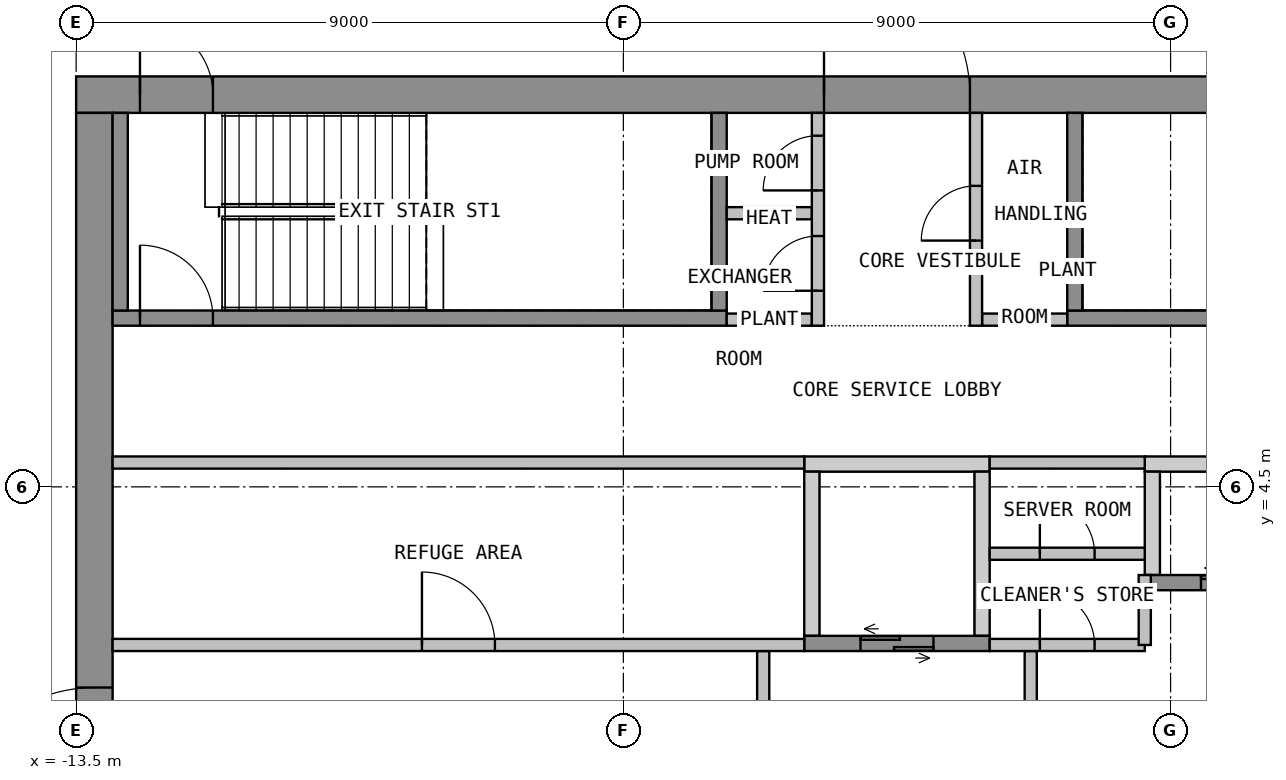
"""IFC4 building model, lengths in metres.
Left out: names, types, materials, properties, quantities, classifications, styles, units other than length and angle.
Written with IfcOpenShell. Run it as: python <this file> out.ifc"""

import sys

from ifc_helpers import new_model, si_unit, direction, frame, frame_2d, origin, place, context, subcontext, project, spatial, polyline, rectangle, outline, extrude, element, fill, save


model = new_model("IFC4")
c1 = context("Model", 3, precision=1e-05, world=origin(), true_north=direction((0.0, 1.0)))
c2 = subcontext(c1, "Body", "Model", "MODEL_VIEW")
j1 = project(units=[si_unit("LENGTHUNIT", "METRE"), si_unit("PLANEANGLEUNIT", "RADIAN")], contexts=[c1])
p1 = place(None, origin())
s1 = spatial("IfcSite", under=j1, at=p1, CompositionType="ELEMENT")
p2 = place(p1, origin())
s2 = spatial("IfcBuilding", under=s1, at=p2, CompositionType="ELEMENT")
p3 = place(p2, frame((0.0, 0.0, 179.4)))
s3 = spatial("IfcBuildingStorey", under=s2, at=p3, CompositionType="ELEMENT", Elevation=179.4)
p4 = place(p3, frame((-13.5, 10.95, 0.0), z_axis=(0.0, 0.0, 1.0), x_axis=(1.0, 0.0, 0.0)))
e1 = element("IfcWall", 1, at=p4, inside=s3, PredefinedType="SHEAR", context=c2, shape_type="SweptSolid", body=[
    extrude(rectangle(XDim=27.0, YDim=0.6, at=frame_2d((13.5, 0.0))), origin(), (0.0, 0.0, 1.0), 4.15),
])
p5 = place(p4, frame((12.3, 0.0, 0.0)))
e2 = element("IfcOpeningElement", 2, at=p5, cuts=e1, PredefinedType="OPENING", context=c2, shape_type="SweptSolid", body=[
    extrude(rectangle(XDim=2.4, YDim=2.1, at=frame_2d((1.2, 1.05))), frame((0.0, 0.31, 0.0), z_axis=(0.0, -1.0, 0.0), x_axis=(1.0, 0.0, 0.0)), (0.0, 0.0, 1.0), 0.62),
])
p6 = place(p4, frame((1.05, 0.0, 0.0)))
e3 = element("IfcOpeningElement", 3, at=p6, cuts=e1, PredefinedType="OPENING", context=c2, shape_type="SweptSolid", body=[
    extrude(rectangle(XDim=1.2, YDim=2.1, at=frame_2d((0.6, 1.05))), frame((0.0, 0.31, 0.0), z_axis=(0.0, -1.0, 0.0), x_axis=(1.0, 0.0, 0.0)), (0.0, 0.0, 1.0), 0.62),
])
p7 = place(p4, frame((24.75, 0.0, 0.0)))
e4 = element("IfcOpeningElement", 4, at=p7, cuts=e1, PredefinedType="OPENING", context=c2, shape_type="SweptSolid", body=[
    extrude(rectangle(XDim=1.2, YDim=2.1, at=frame_2d((0.6, 1.05))), frame((0.0, 0.31, 0.0), z_axis=(0.0, -1.0, 0.0), x_axis=(1.0, 0.0, 0.0)), (0.0, 0.0, 1.0), 0.62),
])
p8 = place(p3, frame((-13.2, -10.65, 0.0), z_axis=(0.0, 0.0, 1.0), x_axis=(0.0, 1.0, 0.0)))
e5 = element("IfcWall", 5, at=p8, inside=s3, PredefinedType="SHEAR", context=c2, shape_type="SweptSolid", body=[
    extrude(rectangle(XDim=21.3, YDim=0.6, at=frame_2d((10.65, 0.0))), origin(), (0.0, 0.0, 1.0), 4.15),
])
p9 = place(p8, frame((9.45, 0.0, 0.0)))
e6 = element("IfcOpeningElement", 6, at=p9, cuts=e5, PredefinedType="OPENING", context=c2, shape_type="SweptSolid", body=[
    extrude(rectangle(XDim=2.4, YDim=2.1, at=frame_2d((1.2, 1.05))), frame((0.0, 0.31, 0.0), z_axis=(0.0, -1.0, 0.0), x_axis=(1.0, 0.0, 0.0)), (0.0, 0.0, 1.0), 0.62),
])
p10 = place(p3, origin())
e7 = element("IfcWall", 7, at=p10, inside=s3, PredefinedType="SHEAR", context=c2, shape_type="SweptSolid", body=[
    extrude(outline(polyline([(-1.525, 4.75), (1.525, 4.75), (1.525, 5.0), (-1.525, 5.0), (-1.525, 4.75)])), origin(), (0.0, 0.0, 1.0), 4.15),
])
p11 = place(p3, origin())
e8 = element("IfcWall", 8, at=p11, inside=s3, PredefinedType="SHEAR", context=c2, shape_type="SweptSolid", body=[
    extrude(outline(polyline([(4.075, 4.75), (12.9, 4.75), (12.9, 5.0), (4.075, 5.0), (4.075, 4.75)])), origin(), (0.0, 0.0, 1.0), 4.15),
])
p12 = place(p3, origin())
e9 = element("IfcWall", 9, at=p12, inside=s3, PredefinedType="SHEAR", context=c2, shape_type="SweptSolid", body=[
    extrude(outline(polyline([(-1.525, 2.05), (-1.275, 2.05), (-1.275, 4.75), (-1.525, 4.75), (-1.525, 2.05)])), origin(), (0.0, 0.0, 1.0), 4.15),
])
p13 = place(p3, origin())
e10 = element("IfcWall", 10, at=p13, inside=s3, PredefinedType="SHEAR", context=c2, shape_type="SweptSolid", body=[
    extrude(outline(polyline([(1.275, 2.05), (1.525, 2.05), (1.525, 4.75), (1.275, 4.75), (1.275, 2.05)])), origin(), (0.0, 0.0, 1.0), 4.15),
])
p14 = place(p3, origin())
e11 = element("IfcWall", 11, at=p14, inside=s3, PredefinedType="SHEAR", context=c2, shape_type="SweptSolid", body=[
    extrude(outline(polyline([(4.075, 3.05), (4.325, 3.05), (4.325, 4.75), (4.075, 4.75), (4.075, 3.05)])), origin(), (0.0, 0.0, 1.0), 4.15),
])
p15 = place(p3, frame((-1.525, 1.925, 0.0), z_axis=(0.0, 0.0, 1.0), x_axis=(1.0, 0.0, 0.0)))
e12 = element("IfcWall", 12, at=p15, inside=s3, PredefinedType="SHEAR", context=c2, shape_type="SweptSolid", body=[
    extrude(rectangle(XDim=3.05, YDim=0.25, at=frame_2d((1.525, 0.0))), origin(), (0.0, 0.0, 1.0), 4.15),
])
p16 = place(p15, frame((0.925, 0.0, 0.0)))
e13 = element("IfcOpeningElement", 13, at=p16, cuts=e12, PredefinedType="OPENING", context=c2, shape_type="SweptSolid", body=[
    extrude(rectangle(XDim=1.2, YDim=2.1, at=frame_2d((0.6, 1.05))), frame((0.0, 0.135, 0.0), z_axis=(0.0, -1.0, 0.0), x_axis=(1.0, 0.0, 0.0)), (0.0, 0.0, 1.0), 0.27),
])
p17 = place(p3, frame((4.075, 2.925, 0.0), z_axis=(0.0, 0.0, 1.0), x_axis=(1.0, 0.0, 0.0)))
e14 = element("IfcWall", 14, at=p17, inside=s3, PredefinedType="SHEAR", context=c2, shape_type="SweptSolid", body=[
    extrude(rectangle(XDim=5.85, YDim=0.25, at=frame_2d((2.925, 0.0))), origin(), (0.0, 0.0, 1.0), 4.15),
])
p18 = place(p17, frame((0.925, 0.0, 0.0)))
e15 = element("IfcOpeningElement", 15, at=p18, cuts=e14, PredefinedType="OPENING", context=c2, shape_type="SweptSolid", body=[
    extrude(rectangle(XDim=1.2, YDim=2.1, at=frame_2d((0.6, 1.05))), frame((0.0, 0.135, 0.0), z_axis=(0.0, -1.0, 0.0), x_axis=(1.0, 0.0, 0.0)), (0.0, 0.0, 1.0), 0.27),
])
p19 = place(p17, frame((3.725, 0.0, 0.0)))
e16 = element("IfcOpeningElement", 16, at=p19, cuts=e14, PredefinedType="OPENING", context=c2, shape_type="SweptSolid", body=[
    extrude(rectangle(XDim=1.2, YDim=2.1, at=frame_2d((0.6, 1.05))), frame((0.0, 0.135, 0.0), z_axis=(0.0, -1.0, 0.0), x_axis=(1.0, 0.0, 0.0)), (0.0, 0.0, 1.0), 0.27),
])
p20 = place(p3, frame((-2.2, -1.8, 0.0), z_axis=(0.0, 0.0, 1.0), x_axis=(0.0, 1.0, 0.0)))
e17 = element("IfcWall", 17, at=p20, inside=s3, PredefinedType="PARTITIONING", context=c2, shape_type="SweptSolid", body=[
    extrude(rectangle(XDim=3.6, YDim=0.2, at=frame_2d((1.8, 0.0))), origin(), (0.0, 0.0, 1.0), 4.15),
])
p21 = place(p20, frame((1.2, 0.0, 0.0)))
e18 = element("IfcOpeningElement", 18, at=p21, cuts=e17, PredefinedType="OPENING", context=c2, shape_type="SweptSolid", body=[
    extrude(rectangle(XDim=1.2, YDim=2.1, at=frame_2d((0.6, 1.05))), frame((0.0, 0.11, 0.0), z_axis=(0.0, -1.0, 0.0), x_axis=(1.0, 0.0, 0.0)), (0.0, 0.0, 1.0), 0.22),
])
p22 = place(p3, frame((2.2, -1.8, 0.0), z_axis=(0.0, 0.0, 1.0), x_axis=(0.0, 1.0, 0.0)))
e19 = element("IfcWall", 19, at=p22, inside=s3, PredefinedType="PARTITIONING", context=c2, shape_type="SweptSolid", body=[
    extrude(rectangle(XDim=3.6, YDim=0.2, at=frame_2d((1.8, 0.0))), origin(), (0.0, 0.0, 1.0), 4.15),
])
p23 = place(p22, frame((1.2, 0.0, 0.0)))
e20 = element("IfcOpeningElement", 20, at=p23, cuts=e19, PredefinedType="OPENING", context=c2, shape_type="SweptSolid", body=[
    extrude(rectangle(XDim=1.2, YDim=2.1, at=frame_2d((0.6, 1.05))), frame((0.0, 0.11, 0.0), z_axis=(0.0, -1.0, 0.0), x_axis=(1.0, 0.0, 0.0)), (0.0, 0.0, 1.0), 0.22),
])
p24 = place(p3, frame((-12.9, 7.275, 0.0), z_axis=(0.0, 0.0, 1.0), x_axis=(1.0, 0.0, 0.0)))
e21 = element("IfcWall", 21, at=p24, inside=s3, PredefinedType="SHEAR", context=c2, shape_type="SweptSolid", body=[
    extrude(rectangle(XDim=10.1, YDim=0.25, at=frame_2d((5.05, 0.0))), origin(), (0.0, 0.0, 1.0), 4.15),
])
p25 = place(p24, frame((0.45, 0.0, 0.0)))
e22 = element("IfcOpeningElement", 22, at=p25, cuts=e21, PredefinedType="OPENING", context=c2, shape_type="SweptSolid", body=[
    extrude(rectangle(XDim=1.2, YDim=2.1, at=frame_2d((0.6, 1.05))), frame((0.0, 0.135, 0.0), z_axis=(0.0, -1.0, 0.0), x_axis=(1.0, 0.0, 0.0)), (0.0, 0.0, 1.0), 0.27),
])
for number, where, z_axis, x_axis in (
    (23, (-12.775, 7.4, 0.0), (0.0, 0.0, 1.0), (0.0, 1.0, 0.0)),
    (24, (-2.925, 7.4, 0.0), (0.0, 0.0, 1.0), (0.0, 1.0, 0.0)),
):
    element("IfcWall", number, at=place(p3, frame(where, z_axis=z_axis, x_axis=x_axis)), inside=s3, PredefinedType="SHEAR", context=c2, shape_type="SweptSolid", body=[
        extrude(rectangle(XDim=3.25, YDim=0.25, at=frame_2d((1.625, 0.0))), origin(), (0.0, 0.0, 1.0), 4.15),
    ])
p26 = place(p3, frame((2.8, 7.275, 0.0), z_axis=(0.0, 0.0, 1.0), x_axis=(1.0, 0.0, 0.0)))
e25 = element("IfcWall", 25, at=p26, inside=s3, PredefinedType="SHEAR", context=c2, shape_type="SweptSolid", body=[
    extrude(rectangle(XDim=10.1, YDim=0.25, at=frame_2d((5.05, 0.0))), origin(), (0.0, 0.0, 1.0), 4.15),
])
p27 = place(p26, frame((8.45, 0.0, 0.0)))
e26 = element("IfcOpeningElement", 26, at=p27, cuts=e25, PredefinedType="OPENING", context=c2, shape_type="SweptSolid", body=[
    extrude(rectangle(XDim=1.2, YDim=2.1, at=frame_2d((0.6, 1.05))), frame((0.0, 0.135, 0.0), z_axis=(0.0, -1.0, 0.0), x_axis=(1.0, 0.0, 0.0)), (0.0, 0.0, 1.0), 0.27),
])
p28 = place(p3, frame((2.925, 7.4, 0.0), z_axis=(0.0, 0.0, 1.0), x_axis=(0.0, 1.0, 0.0)))
e27 = element("IfcWall", 27, at=p28, inside=s3, PredefinedType="SHEAR", context=c2, shape_type="SweptSolid", body=[
    extrude(rectangle(XDim=3.25, YDim=0.25, at=frame_2d((1.625, 0.0))), origin(), (0.0, 0.0, 1.0), 4.15),
])
for number, where, z_axis, x_axis in (
    (28, (-2.8, 7.25, 0.0), (0.0, 0.0, 1.0), (1.0, 0.0, 0.0)),
    (29, (-2.8, 9.0, 0.0), (0.0, 0.0, 1.0), (1.0, 0.0, 0.0)),
    (30, (1.4, 7.25, 0.0), (0.0, 0.0, 1.0), (1.0, 0.0, 0.0)),
):
    element("IfcWall", number, at=place(p3, frame(where, z_axis=z_axis, x_axis=x_axis)), inside=s3, PredefinedType="PARTITIONING", context=c2, shape_type="SweptSolid", body=[
        extrude(rectangle(XDim=1.4, YDim=0.2, at=frame_2d((0.7, 0.0))), origin(), (0.0, 0.0, 1.0), 4.15),
    ])
p29 = place(p3, frame((-1.3, 7.15, 0.0), z_axis=(0.0, 0.0, 1.0), x_axis=(0.0, 1.0, 0.0)))
e31 = element("IfcWall", 31, at=p29, inside=s3, PredefinedType="PARTITIONING", context=c2, shape_type="SweptSolid", body=[
    extrude(rectangle(XDim=3.5, YDim=0.2, at=frame_2d((1.75, 0.0))), origin(), (0.0, 0.0, 1.0), 4.15),
])
p30 = place(p29, frame((0.575, 0.0, 0.0)))
e32 = element("IfcOpeningElement", 32, at=p30, cuts=e31, PredefinedType="OPENING", context=c2, shape_type="SweptSolid", body=[
    extrude(rectangle(XDim=0.9, YDim=2.1, at=frame_2d((0.45, 1.05))), frame((0.0, 0.11, 0.0), z_axis=(0.0, -1.0, 0.0), x_axis=(1.0, 0.0, 0.0)), (0.0, 0.0, 1.0), 0.22),
])
p31 = place(p29, frame((2.225, 0.0, 0.0)))
e33 = element("IfcOpeningElement", 33, at=p31, cuts=e31, PredefinedType="OPENING", context=c2, shape_type="SweptSolid", body=[
    extrude(rectangle(XDim=0.9, YDim=2.1, at=frame_2d((0.45, 1.05))), frame((0.0, 0.11, 0.0), z_axis=(0.0, -1.0, 0.0), x_axis=(1.0, 0.0, 0.0)), (0.0, 0.0, 1.0), 0.22),
])
p32 = place(p3, frame((1.3, 7.15, 0.0), z_axis=(0.0, 0.0, 1.0), x_axis=(0.0, 1.0, 0.0)))
e34 = element("IfcWall", 34, at=p32, inside=s3, PredefinedType="PARTITIONING", context=c2, shape_type="SweptSolid", body=[
    extrude(rectangle(XDim=3.5, YDim=0.2, at=frame_2d((1.75, 0.0))), origin(), (0.0, 0.0, 1.0), 4.15),
])
p33 = place(p32, frame((1.4, 0.0, 0.0)))
e35 = element("IfcOpeningElement", 35, at=p33, cuts=e34, PredefinedType="OPENING", context=c2, shape_type="SweptSolid", body=[
    extrude(rectangle(XDim=0.9, YDim=2.1, at=frame_2d((0.45, 1.05))), frame((0.0, 0.11, 0.0), z_axis=(0.0, -1.0, 0.0), x_axis=(1.0, 0.0, 0.0)), (0.0, 0.0, 1.0), 0.22),
])
p34 = place(p3, frame((-12.9, 1.9, 0.0), z_axis=(0.0, 0.0, 1.0), x_axis=(1.0, 0.0, 0.0)))
e36 = element("IfcWall", 36, at=p34, inside=s3, PredefinedType="PARTITIONING", context=c2, shape_type="SweptSolid", body=[
    extrude(rectangle(XDim=11.375, YDim=0.2, at=frame_2d((5.688, 0.0))), origin(), (0.0, 0.0, 1.0), 4.15),
])
p35 = place(p34, frame((5.087, 0.0, 0.0)))
e37 = element("IfcOpeningElement", 37, at=p35, cuts=e36, PredefinedType="OPENING", context=c2, shape_type="SweptSolid", body=[
    extrude(rectangle(XDim=1.2, YDim=2.1, at=frame_2d((0.6, 1.05))), frame((0.0, 0.11, 0.0), z_axis=(0.0, -1.0, 0.0), x_axis=(1.0, 0.0, 0.0)), (0.0, 0.0, 1.0), 0.22),
])
p36 = place(p3, frame((-12.9, 4.9, 0.0), z_axis=(0.0, 0.0, 1.0), x_axis=(1.0, 0.0, 0.0)))
e38 = element("IfcWall", 38, at=p36, inside=s3, PredefinedType="PARTITIONING", context=c2, shape_type="SweptSolid", body=[
    extrude(rectangle(XDim=11.375, YDim=0.2, at=frame_2d((5.688, 0.0))), origin(), (0.0, 0.0, 1.0), 4.15),
])
p37 = place(p3, frame((1.525, 3.4, 0.0), z_axis=(0.0, 0.0, 1.0), x_axis=(1.0, 0.0, 0.0)))
e39 = element("IfcWall", 39, at=p37, inside=s3, PredefinedType="PARTITIONING", context=c2, shape_type="SweptSolid", body=[
    extrude(rectangle(XDim=2.55, YDim=0.2, at=frame_2d((1.275, 0.0))), origin(), (0.0, 0.0, 1.0), 4.15),
])
p38 = place(p37, frame((0.825, 0.0, 0.0)))
e40 = element("IfcOpeningElement", 40, at=p38, cuts=e39, PredefinedType="OPENING", context=c2, shape_type="SweptSolid", body=[
    extrude(rectangle(XDim=0.9, YDim=2.1, at=frame_2d((0.45, 1.05))), frame((0.0, 0.11, 0.0), z_axis=(0.0, -1.0, 0.0), x_axis=(1.0, 0.0, 0.0)), (0.0, 0.0, 1.0), 0.22),
])
p39 = place(p3, frame((1.525, 1.9, 0.0), z_axis=(0.0, 0.0, 1.0), x_axis=(1.0, 0.0, 0.0)))
e41 = element("IfcWall", 41, at=p39, inside=s3, PredefinedType="PARTITIONING", context=c2, shape_type="SweptSolid", body=[
    extrude(rectangle(XDim=2.55, YDim=0.2, at=frame_2d((1.275, 0.0))), origin(), (0.0, 0.0, 1.0), 4.15),
])
p40 = place(p39, frame((0.825, 0.0, 0.0)))
e42 = element("IfcOpeningElement", 42, at=p40, cuts=e41, PredefinedType="OPENING", context=c2, shape_type="SweptSolid", body=[
    extrude(rectangle(XDim=0.9, YDim=2.1, at=frame_2d((0.45, 1.05))), frame((0.0, 0.11, 0.0), z_axis=(0.0, -1.0, 0.0), x_axis=(1.0, 0.0, 0.0)), (0.0, 0.0, 1.0), 0.22),
])
p41 = place(p3, frame((1.525, 4.9, 0.0), z_axis=(0.0, 0.0, 1.0), x_axis=(1.0, 0.0, 0.0)))
e43 = element("IfcWall", 43, at=p41, inside=s3, PredefinedType="PARTITIONING", context=c2, shape_type="SweptSolid", body=[
    extrude(rectangle(XDim=2.55, YDim=0.2, at=frame_2d((1.275, 0.0))), origin(), (0.0, 0.0, 1.0), 4.15),
])
p42 = place(p3, frame((4.075, 1.9, 0.0), z_axis=(0.0, 0.0, 1.0), x_axis=(0.0, 1.0, 0.0)))
e44 = element("IfcWall", 44, at=p42, inside=s3, PredefinedType="PARTITIONING", context=c2, shape_type="SweptSolid", body=[
    extrude(rectangle(XDim=1.15, YDim=0.2, at=frame_2d((0.575, 0.0))), origin(), (0.0, 0.0, 1.0), 4.15),
])
p43 = place(p9, origin())
e45 = element("IfcDoor", 45, at=p43, inside=s3, OperationType="DOUBLE_DOOR_DOUBLE_SWING", PredefinedType="DOOR", context=c2, shape_type="SweptSolid", body=[
    extrude(rectangle(XDim=2.4, YDim=2.1, at=frame_2d((1.2, 1.05))), frame((0.0, 0.025, 0.0), z_axis=(0.0, -1.0, 0.0), x_axis=(1.0, 0.0, 0.0)), (0.0, 0.0, 1.0), 0.05),
])
fill(e6, e45)
p44 = place(p5, origin())
e46 = element("IfcDoor", 46, at=p44, inside=s3, OperationType="DOUBLE_DOOR_DOUBLE_SWING", PredefinedType="DOOR", context=c2, shape_type="SweptSolid", body=[
    extrude(rectangle(XDim=2.4, YDim=2.1, at=frame_2d((1.2, 1.05))), frame((0.0, 0.025, 0.0), z_axis=(0.0, -1.0, 0.0), x_axis=(1.0, 0.0, 0.0)), (0.0, 0.0, 1.0), 0.05),
])
fill(e2, e46)
p45 = place(p6, origin())
e47 = element("IfcDoor", 47, at=p45, inside=s3, OperationType="SINGLE_SWING_RIGHT", PredefinedType="DOOR", context=c2, shape_type="SweptSolid", body=[
    extrude(rectangle(XDim=1.2, YDim=2.1, at=frame_2d((0.6, 1.05))), frame((0.0, 0.025, 0.0), z_axis=(0.0, -1.0, 0.0), x_axis=(1.0, 0.0, 0.0)), (0.0, 0.0, 1.0), 0.05),
])
fill(e3, e47)
p46 = place(p16, origin())
e48 = element("IfcDoor", 48, at=p46, inside=s3, OperationType="DOUBLE_DOOR_SLIDING", PredefinedType="DOOR", context=c2, shape_type="SweptSolid", body=[
    extrude(rectangle(XDim=1.2, YDim=2.1, at=frame_2d((0.6, 1.05))), frame((0.0, 0.025, 0.0), z_axis=(0.0, -1.0, 0.0), x_axis=(1.0, 0.0, 0.0)), (0.0, 0.0, 1.0), 0.05),
])
fill(e13, e48)
p47 = place(p18, origin())
e49 = element("IfcDoor", 49, at=p47, inside=s3, OperationType="DOUBLE_DOOR_SLIDING", PredefinedType="DOOR", context=c2, shape_type="SweptSolid", body=[
    extrude(rectangle(XDim=1.2, YDim=2.1, at=frame_2d((0.6, 1.05))), frame((0.0, 0.025, 0.0), z_axis=(0.0, -1.0, 0.0), x_axis=(1.0, 0.0, 0.0)), (0.0, 0.0, 1.0), 0.05),
])
fill(e15, e49)
p48 = place(p25, origin())
e50 = element("IfcDoor", 50, at=p48, inside=s3, OperationType="SINGLE_SWING_LEFT", PredefinedType="DOOR", context=c2, shape_type="SweptSolid", body=[
    extrude(rectangle(XDim=1.2, YDim=2.1, at=frame_2d((0.6, 1.05))), frame((0.0, 0.025, 0.0), z_axis=(0.0, -1.0, 0.0), x_axis=(1.0, 0.0, 0.0)), (0.0, 0.0, 1.0), 0.05),
])
fill(e22, e50)
p49 = place(p30, origin())
e51 = element("IfcDoor", 51, at=p49, inside=s3, OperationType="SINGLE_SWING_LEFT", PredefinedType="DOOR", context=c2, shape_type="SweptSolid", body=[
    extrude(rectangle(XDim=0.9, YDim=2.1, at=frame_2d((0.45, 1.05))), frame((0.0, 0.025, 0.0), z_axis=(0.0, -1.0, 0.0), x_axis=(1.0, 0.0, 0.0)), (0.0, 0.0, 1.0), 0.05),
])
fill(e32, e51)
p50 = place(p31, origin())
e52 = element("IfcDoor", 52, at=p50, inside=s3, OperationType="SINGLE_SWING_LEFT", PredefinedType="DOOR", context=c2, shape_type="SweptSolid", body=[
    extrude(rectangle(XDim=0.9, YDim=2.1, at=frame_2d((0.45, 1.05))), frame((0.0, 0.025, 0.0), z_axis=(0.0, -1.0, 0.0), x_axis=(1.0, 0.0, 0.0)), (0.0, 0.0, 1.0), 0.05),
])
fill(e33, e52)
p51 = place(p33, origin())
e53 = element("IfcDoor", 53, at=p51, inside=s3, OperationType="SINGLE_SWING_LEFT", PredefinedType="DOOR", context=c2, shape_type="SweptSolid", body=[
    extrude(rectangle(XDim=0.9, YDim=2.1, at=frame_2d((0.45, 1.05))), frame((0.0, 0.025, 0.0), z_axis=(0.0, -1.0, 0.0), x_axis=(1.0, 0.0, 0.0)), (0.0, 0.0, 1.0), 0.05),
])
fill(e35, e53)
p52 = place(p35, origin())
e54 = element("IfcDoor", 54, at=p52, inside=s3, OperationType="SINGLE_SWING_RIGHT", PredefinedType="DOOR", context=c2, shape_type="SweptSolid", body=[
    extrude(rectangle(XDim=1.2, YDim=2.1, at=frame_2d((0.6, 1.05))), frame((0.0, 0.025, 0.0), z_axis=(0.0, -1.0, 0.0), x_axis=(1.0, 0.0, 0.0)), (0.0, 0.0, 1.0), 0.05),
])
fill(e37, e54)
p53 = place(p38, origin())
e55 = element("IfcDoor", 55, at=p53, inside=s3, OperationType="SINGLE_SWING_LEFT", PredefinedType="DOOR", context=c2, shape_type="SweptSolid", body=[
    extrude(rectangle(XDim=0.9, YDim=2.1, at=frame_2d((0.45, 1.05))), frame((0.0, 0.025, 0.0), z_axis=(0.0, -1.0, 0.0), x_axis=(1.0, 0.0, 0.0)), (0.0, 0.0, 1.0), 0.05),
])
fill(e40, e55)
p54 = place(p40, origin())
e56 = element("IfcDoor", 56, at=p54, inside=s3, OperationType="SINGLE_SWING_LEFT", PredefinedType="DOOR", context=c2, shape_type="SweptSolid", body=[
    extrude(rectangle(XDim=0.9, YDim=2.1, at=frame_2d((0.45, 1.05))), frame((0.0, 0.025, 0.0), z_axis=(0.0, -1.0, 0.0), x_axis=(1.0, 0.0, 0.0)), (0.0, 0.0, 1.0), 0.05),
])
fill(e42, e56)
save(model, sys.argv[1])
